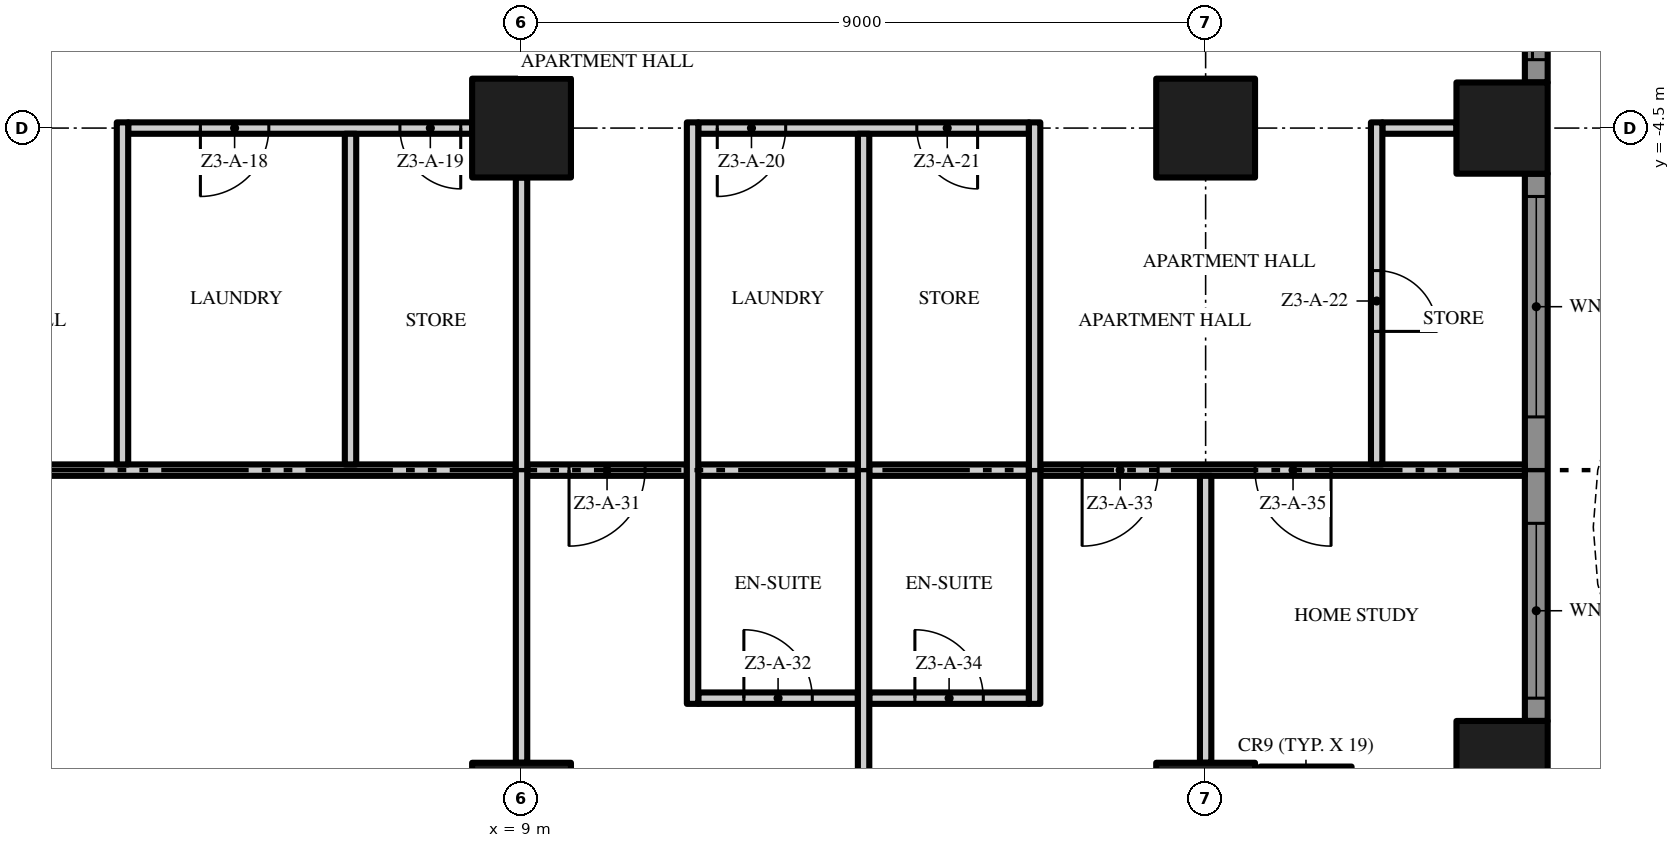
"""IFC4 building model, lengths in metres.
Left out: names, types, materials, properties, quantities, classifications, styles, units other than length and angle.
Written with IfcOpenShell. Run it as: python <this file> out.ifc"""

import sys

from ifc_helpers import new_model, si_unit, direction, frame, frame_2d, origin, origin_2d, place, context, subcontext, project, spatial, polyline, rectangle, outline, extrude, element, fill, save


model = new_model("IFC4")
c1 = context("Model", 3, precision=1e-05, world=origin(), true_north=direction((0.0, 1.0)))
c2 = subcontext(c1, "Body", "Model", "MODEL_VIEW")
j1 = project(units=[si_unit("LENGTHUNIT", "METRE"), si_unit("PLANEANGLEUNIT", "RADIAN")], contexts=[c1])
p1 = place(None, origin())
s1 = spatial("IfcSite", under=j1, at=p1, CompositionType="ELEMENT")
p2 = place(p1, origin())
s2 = spatial("IfcBuilding", under=s1, at=p2, CompositionType="ELEMENT")
p3 = place(p2, frame((0.0, 0.0, 128.8)))
s3 = spatial("IfcBuildingStorey", under=s2, at=p3, CompositionType="ELEMENT", Elevation=128.8)
for number, where, z_axis, x_axis in (
    (1, (18.0, -13.5, 0.0), (0.0, 0.0, 1.0), (1.0, 0.0, 0.0)),
    (2, (18.0, -4.5, 0.0), (0.0, 0.0, 1.0), (1.0, 0.0, 0.0)),
):
    element("IfcColumn", number, at=place(p3, frame(where, z_axis=z_axis, x_axis=x_axis)), inside=s3, PredefinedType="COLUMN", context=c2, shape_type="SweptSolid", body=[
        extrude(rectangle(XDim=1.3, YDim=1.3, at=origin_2d()), origin(), (0.0, 0.0, 1.0), 3.5),
    ])
for number, where, z_axis, x_axis in (
    (3, (21.9, -12.9, 0.0), (0.0, 0.0, 1.0), (1.0, 0.0, 0.0)),
    (4, (19.32, -13.5, 0.0), (0.0, 0.0, 1.0), (1.0, 0.0, 0.0)),
    (5, (21.9, -4.5, 0.0), (0.0, 0.0, 1.0), (1.0, 0.0, 0.0)),
):
    element("IfcColumn", number, at=place(p3, frame(where, z_axis=z_axis, x_axis=x_axis)), inside=s3, PredefinedType="COLUMN", context=c2, shape_type="SweptSolid", body=[
        extrude(rectangle(XDim=1.2, YDim=1.2, at=origin_2d()), origin(), (0.0, 0.0, 1.0), 3.5),
    ])
for number, where, z_axis, x_axis in (
    (6, (9.0, -13.5, 0.0), (0.0, 0.0, 1.0), (1.0, 0.0, 0.0)),
    (7, (9.0, -4.5, 0.0), (0.0, 0.0, 1.0), (1.0, 0.0, 0.0)),
):
    element("IfcColumn", number, at=place(p3, frame(where, z_axis=z_axis, x_axis=x_axis)), inside=s3, PredefinedType="COLUMN", context=c2, shape_type="SweptSolid", body=[
        extrude(rectangle(XDim=1.3, YDim=1.3, at=origin_2d()), origin(), (0.0, 0.0, 1.0), 3.5),
    ])
p4 = place(p3, frame((22.35, -5.1, 0.0), z_axis=(0.0, 0.0, 1.0), x_axis=(0.0, -1.0, 0.0)))
e8 = element("IfcWall", 8, at=p4, inside=s3, PredefinedType="SOLIDWALL", context=c2, shape_type="SweptSolid", body=[
    extrude(rectangle(XDim=7.2, YDim=0.3, at=frame_2d((3.6, 0.0))), origin(), (0.0, 0.0, 1.0), 3.5),
])
p5 = place(p4, frame((4.6, 0.0, 0.45)))
e9 = element("IfcOpeningElement", 9, at=p5, cuts=e8, PredefinedType="OPENING", context=c2, shape_type="SweptSolid", body=[
    extrude(rectangle(XDim=2.3, YDim=2.65, at=frame_2d((1.15, 1.325))), frame((0.0, 0.16, 0.0), z_axis=(0.0, -1.0, 0.0), x_axis=(1.0, 0.0, 0.0)), (0.0, 0.0, 1.0), 0.32),
])
p6 = place(p4, frame((0.3, 0.0, 0.45)))
e10 = element("IfcOpeningElement", 10, at=p6, cuts=e8, PredefinedType="OPENING", context=c2, shape_type="SweptSolid", body=[
    extrude(rectangle(XDim=2.9, YDim=2.65, at=frame_2d((1.45, 1.325))), frame((0.0, 0.16, 0.0), z_axis=(0.0, -1.0, 0.0), x_axis=(1.0, 0.0, 0.0)), (0.0, 0.0, 1.0), 0.32),
])
p7 = place(p3, frame((22.35, 3.9, 0.0), z_axis=(0.0, 0.0, 1.0), x_axis=(0.0, -1.0, 0.0)))
e11 = element("IfcWall", 11, at=p7, inside=s3, PredefinedType="SOLIDWALL", context=c2, shape_type="SweptSolid", body=[
    extrude(rectangle(XDim=7.8, YDim=0.3, at=frame_2d((3.9, 0.0))), origin(), (0.0, 0.0, 1.0), 3.5),
])
p8 = place(p7, frame((4.6, 0.0, 0.0)))
e12 = element("IfcOpeningElement", 12, at=p8, cuts=e11, PredefinedType="OPENING", context=c2, shape_type="SweptSolid", body=[
    extrude(rectangle(XDim=2.9, YDim=2.4, at=frame_2d((1.45, 1.2))), frame((0.0, 0.16, 0.0), z_axis=(0.0, -1.0, 0.0), x_axis=(1.0, 0.0, 0.0)), (0.0, 0.0, 1.0), 0.32),
])
p9 = place(p7, frame((0.3, 0.0, 0.45)))
e13 = element("IfcOpeningElement", 13, at=p9, cuts=e11, PredefinedType="OPENING", context=c2, shape_type="SweptSolid", body=[
    extrude(rectangle(XDim=2.9, YDim=2.65, at=frame_2d((1.45, 1.325))), frame((0.0, 0.16, 0.0), z_axis=(0.0, -1.0, 0.0), x_axis=(1.0, 0.0, 0.0)), (0.0, 0.0, 1.0), 0.32),
])
p10 = place(p3, origin())
e14 = element("IfcWall", 14, at=p10, inside=s3, PredefinedType="USERDEFINED", context=c2, shape_type="SweptSolid", body=[
    extrude(outline(polyline([(24.3, -13.5), (23.595, -12.0), (23.159, -10.5), (23.1, -9.75), (23.159, -9.0), (23.595, -7.5), (24.3, -6.0), (25.005, -4.5), (25.441, -3.0), (25.5, -2.25), (25.441, -1.5), (25.005, 0.0), (24.3, 1.5), (23.595, 3.0), (23.159, 4.5), (23.1, 5.25), (23.159, 6.0), (23.595, 7.5), (24.3, 9.0), (25.005, 10.5), (25.441, 12.0), (25.5, 12.75), (25.441, 13.5), (25.005, 15.0), (24.3, 16.5), (23.595, 18.0), (23.368, 17.894), (24.074, 16.394), (24.771, 14.911), (25.194, 13.455), (25.249, 12.75), (25.194, 12.045), (24.771, 10.589), (24.074, 9.106), (23.36, 7.589), (22.911, 6.045), (22.849, 5.25), (22.911, 4.455), (23.36, 2.911), (24.074, 1.394), (24.771, -0.089), (25.194, -1.545), (25.249, -2.25), (25.194, -2.955), (24.771, -4.411), (24.074, -5.894), (23.36, -7.411), (22.911, -8.955), (22.849, -9.75), (22.911, -10.545), (23.36, -12.089), (24.074, -13.606), (24.3, -13.5)])), origin(), (0.0, 0.0, 1.0), 0.9),
])
p11 = place(p3, frame((11.325, -12.0, 0.0), z_axis=(0.0, 0.0, 1.0), x_axis=(1.0, 0.0, 0.0)))
e15 = element("IfcWall", 15, at=p11, inside=s3, PredefinedType="PARTITIONING", context=c2, shape_type="SweptSolid", body=[
    extrude(rectangle(XDim=2.1, YDim=0.15, at=frame_2d((1.05, 0.0))), origin(), (0.0, 0.0, 1.0), 3.5),
])
p12 = place(p11, frame((0.6, 0.0, 0.0)))
e16 = element("IfcOpeningElement", 16, at=p12, cuts=e15, PredefinedType="OPENING", context=c2, shape_type="SweptSolid", body=[
    extrude(rectangle(XDim=0.9, YDim=2.1, at=frame_2d((0.45, 1.05))), frame((0.0, 0.085, 0.0), z_axis=(0.0, -1.0, 0.0), x_axis=(1.0, 0.0, 0.0)), (0.0, 0.0, 1.0), 0.17),
])
p13 = place(p3, frame((13.575, -12.0, 0.0), z_axis=(0.0, 0.0, 1.0), x_axis=(1.0, 0.0, 0.0)))
e17 = element("IfcWall", 17, at=p13, inside=s3, PredefinedType="PARTITIONING", context=c2, shape_type="SweptSolid", body=[
    extrude(rectangle(XDim=2.1, YDim=0.15, at=frame_2d((1.05, 0.0))), origin(), (0.0, 0.0, 1.0), 3.5),
])
p14 = place(p13, frame((0.6, 0.0, 0.0)))
e18 = element("IfcOpeningElement", 18, at=p14, cuts=e17, PredefinedType="OPENING", context=c2, shape_type="SweptSolid", body=[
    extrude(rectangle(XDim=0.9, YDim=2.1, at=frame_2d((0.45, 1.05))), frame((0.0, 0.085, 0.0), z_axis=(0.0, -1.0, 0.0), x_axis=(1.0, 0.0, 0.0)), (0.0, 0.0, 1.0), 0.17),
])
p15 = place(p3, frame((8.925, -9.0, 0.0), z_axis=(0.0, 0.0, 1.0), x_axis=(-1.0, 0.0, 0.0)))
e19 = element("IfcWall", 19, at=p15, inside=s3, PredefinedType="PARTITIONING", context=c2, shape_type="SweptSolid", body=[
    extrude(rectangle(XDim=8.85, YDim=0.15, at=frame_2d((4.425, 0.0))), origin(), (0.0, 0.0, 1.0), 3.5),
])
p16 = place(p15, frame((6.3, 0.0, 0.0)))
e20 = element("IfcOpeningElement", 20, at=p16, cuts=e19, PredefinedType="OPENING", context=c2, shape_type="SweptSolid", body=[
    extrude(rectangle(XDim=1.5, YDim=2.4, at=frame_2d((0.75, 1.2))), frame((0.0, 0.085, 0.0), z_axis=(0.0, -1.0, 0.0), x_axis=(1.0, 0.0, 0.0)), (0.0, 0.0, 1.0), 0.17),
])
p17 = place(p3, frame((11.175, -9.0, 0.0), z_axis=(0.0, 0.0, 1.0), x_axis=(-1.0, 0.0, 0.0)))
e21 = element("IfcWall", 21, at=p17, inside=s3, PredefinedType="PARTITIONING", context=c2, shape_type="SweptSolid", body=[
    extrude(rectangle(XDim=2.1, YDim=0.15, at=frame_2d((1.05, 0.0))), origin(), (0.0, 0.0, 1.0), 3.5),
])
p18 = place(p17, frame((0.55, 0.0, 0.0)))
e22 = element("IfcOpeningElement", 22, at=p18, cuts=e21, PredefinedType="OPENING", context=c2, shape_type="SweptSolid", body=[
    extrude(rectangle(XDim=1.0, YDim=2.4, at=frame_2d((0.5, 1.2))), frame((0.0, 0.085, 0.0), z_axis=(0.0, -1.0, 0.0), x_axis=(1.0, 0.0, 0.0)), (0.0, 0.0, 1.0), 0.17),
])
for number, where, z_axis, x_axis in (
    (23, (11.325, -9.0, 0.0), (0.0, 0.0, 1.0), (1.0, 0.0, 0.0)),
    (24, (13.575, -9.0, 0.0), (0.0, 0.0, 1.0), (1.0, 0.0, 0.0)),
):
    element("IfcWall", number, at=place(p3, frame(where, z_axis=z_axis, x_axis=x_axis)), inside=s3, PredefinedType="PARTITIONING", context=c2, shape_type="SweptSolid", body=[
        extrude(rectangle(XDim=2.1, YDim=0.15, at=frame_2d((1.05, 0.0))), origin(), (0.0, 0.0, 1.0), 3.5),
    ])
p19 = place(p3, frame((22.2, -9.0, 0.0), z_axis=(0.0, 0.0, 1.0), x_axis=(-1.0, 0.0, 0.0)))
e25 = element("IfcWall", 25, at=p19, inside=s3, PredefinedType="PARTITIONING", context=c2, shape_type="SweptSolid", body=[
    extrude(rectangle(XDim=6.375, YDim=0.15, at=frame_2d((3.188, 0.0))), origin(), (0.0, 0.0, 1.0), 3.5),
])
p20 = place(p19, frame((4.825, 0.0, 0.0)))
e26 = element("IfcOpeningElement", 26, at=p20, cuts=e25, PredefinedType="OPENING", context=c2, shape_type="SweptSolid", body=[
    extrude(rectangle(XDim=1.0, YDim=2.4, at=frame_2d((0.5, 1.2))), frame((0.0, 0.085, 0.0), z_axis=(0.0, -1.0, 0.0), x_axis=(1.0, 0.0, 0.0)), (0.0, 0.0, 1.0), 0.17),
])
p21 = place(p19, frame((2.55, 0.0, 0.0)))
e27 = element("IfcOpeningElement", 27, at=p21, cuts=e25, PredefinedType="OPENING", context=c2, shape_type="SweptSolid", body=[
    extrude(rectangle(XDim=1.0, YDim=2.4, at=frame_2d((0.5, 1.2))), frame((0.0, 0.085, 0.0), z_axis=(0.0, -1.0, 0.0), x_axis=(1.0, 0.0, 0.0)), (0.0, 0.0, 1.0), 0.17),
])
p22 = place(p3, frame((8.35, -4.5, 0.0), z_axis=(0.0, 0.0, 1.0), x_axis=(-1.0, 0.0, 0.0)))
e28 = element("IfcWall", 28, at=p22, inside=s3, PredefinedType="PARTITIONING", context=c2, shape_type="SweptSolid", body=[
    extrude(rectangle(XDim=4.525, YDim=0.15, at=frame_2d((2.263, 0.0))), origin(), (0.0, 0.0, 1.0), 3.5),
])
p23 = place(p22, frame((2.675, 0.0, 0.0)))
e29 = element("IfcOpeningElement", 29, at=p23, cuts=e28, PredefinedType="OPENING", context=c2, shape_type="SweptSolid", body=[
    extrude(rectangle(XDim=0.9, YDim=2.1, at=frame_2d((0.45, 1.05))), frame((0.0, 0.085, 0.0), z_axis=(0.0, -1.0, 0.0), x_axis=(1.0, 0.0, 0.0)), (0.0, 0.0, 1.0), 0.17),
])
p24 = place(p22, frame((0.15, 0.0, 0.0)))
e30 = element("IfcOpeningElement", 30, at=p24, cuts=e28, PredefinedType="OPENING", context=c2, shape_type="SweptSolid", body=[
    extrude(rectangle(XDim=0.8, YDim=2.0, at=frame_2d((0.4, 1.0))), frame((0.0, 0.085, 0.0), z_axis=(0.0, -1.0, 0.0), x_axis=(1.0, 0.0, 0.0)), (0.0, 0.0, 1.0), 0.17),
])
p25 = place(p3, frame((15.675, -4.5, 0.0), z_axis=(0.0, 0.0, 1.0), x_axis=(-1.0, 0.0, 0.0)))
e31 = element("IfcWall", 31, at=p25, inside=s3, PredefinedType="PARTITIONING", context=c2, shape_type="SweptSolid", body=[
    extrude(rectangle(XDim=4.35, YDim=0.15, at=frame_2d((2.175, 0.0))), origin(), (0.0, 0.0, 1.0), 3.5),
])
p26 = place(p25, frame((3.2, 0.0, 0.0)))
e32 = element("IfcOpeningElement", 32, at=p26, cuts=e31, PredefinedType="OPENING", context=c2, shape_type="SweptSolid", body=[
    extrude(rectangle(XDim=0.9, YDim=2.1, at=frame_2d((0.45, 1.05))), frame((0.0, 0.085, 0.0), z_axis=(0.0, -1.0, 0.0), x_axis=(1.0, 0.0, 0.0)), (0.0, 0.0, 1.0), 0.17),
])
p27 = place(p25, frame((0.675, 0.0, 0.0)))
e33 = element("IfcOpeningElement", 33, at=p27, cuts=e31, PredefinedType="OPENING", context=c2, shape_type="SweptSolid", body=[
    extrude(rectangle(XDim=0.8, YDim=2.0, at=frame_2d((0.4, 1.0))), frame((0.0, 0.085, 0.0), z_axis=(0.0, -1.0, 0.0), x_axis=(1.0, 0.0, 0.0)), (0.0, 0.0, 1.0), 0.17),
])
p28 = place(p3, frame((20.325, -4.5, 0.0), z_axis=(0.0, 0.0, 1.0), x_axis=(1.0, 0.0, 0.0)))
e34 = element("IfcWall", 34, at=p28, inside=s3, PredefinedType="PARTITIONING", context=c2, shape_type="SweptSolid", body=[
    extrude(rectangle(XDim=0.975, YDim=0.15, at=frame_2d((0.487, 0.0))), origin(), (0.0, 0.0, 1.0), 3.5),
])
p29 = place(p3, frame((3.75, -8.925, 0.0), z_axis=(0.0, 0.0, 1.0), x_axis=(0.0, 1.0, 0.0)))
e35 = element("IfcWall", 35, at=p29, inside=s3, PredefinedType="PARTITIONING", context=c2, shape_type="SweptSolid", body=[
    extrude(rectangle(XDim=4.5, YDim=0.15, at=frame_2d((2.25, 0.0))), origin(), (0.0, 0.0, 1.0), 3.5),
])
p30 = place(p3, frame((6.75, -8.925, 0.0), z_axis=(0.0, 0.0, 1.0), x_axis=(0.0, 1.0, 0.0)))
e36 = element("IfcWall", 36, at=p30, inside=s3, PredefinedType="PARTITIONING", context=c2, shape_type="SweptSolid", body=[
    extrude(rectangle(XDim=4.35, YDim=0.15, at=frame_2d((2.175, 0.0))), origin(), (0.0, 0.0, 1.0), 3.5),
])
p31 = place(p3, frame((9.0, -12.85, 0.0), z_axis=(0.0, 0.0, 1.0), x_axis=(0.0, 1.0, 0.0)))
e37 = element("IfcWall", 37, at=p31, inside=s3, PredefinedType="PARTITIONING", context=c2, shape_type="SweptSolid", body=[
    extrude(rectangle(XDim=7.7, YDim=0.15, at=frame_2d((3.85, 0.0))), origin(), (0.0, 0.0, 1.0), 3.5),
])
p32 = place(p3, frame((11.25, -12.075, 0.0), z_axis=(0.0, 0.0, 1.0), x_axis=(0.0, 1.0, 0.0)))
e38 = element("IfcWall", 38, at=p32, inside=s3, PredefinedType="PARTITIONING", context=c2, shape_type="SweptSolid", body=[
    extrude(rectangle(XDim=7.65, YDim=0.15, at=frame_2d((3.825, 0.0))), origin(), (0.0, 0.0, 1.0), 3.5),
])
p33 = place(p3, frame((13.5, -17.7, 0.0), z_axis=(0.0, 0.0, 1.0), x_axis=(0.0, 1.0, 0.0)))
e39 = element("IfcWall", 39, at=p33, inside=s3, PredefinedType="PARTITIONING", context=c2, shape_type="SweptSolid", body=[
    extrude(rectangle(XDim=13.125, YDim=0.15, at=frame_2d((6.562, 0.0))), origin(), (0.0, 0.0, 1.0), 3.5),
])
p34 = place(p3, frame((15.75, -12.075, 0.0), z_axis=(0.0, 0.0, 1.0), x_axis=(0.0, 1.0, 0.0)))
e40 = element("IfcWall", 40, at=p34, inside=s3, PredefinedType="PARTITIONING", context=c2, shape_type="SweptSolid", body=[
    extrude(rectangle(XDim=7.65, YDim=0.15, at=frame_2d((3.825, 0.0))), origin(), (0.0, 0.0, 1.0), 3.5),
])
p35 = place(p3, frame((18.0, -12.85, 0.0), z_axis=(0.0, 0.0, 1.0), x_axis=(0.0, 1.0, 0.0)))
e41 = element("IfcWall", 41, at=p35, inside=s3, PredefinedType="PARTITIONING", context=c2, shape_type="SweptSolid", body=[
    extrude(rectangle(XDim=3.775, YDim=0.15, at=frame_2d((1.887, 0.0))), origin(), (0.0, 0.0, 1.0), 3.5),
])
p36 = place(p3, frame((20.25, -4.425, 0.0), z_axis=(0.0, 0.0, 1.0), x_axis=(0.0, -1.0, 0.0)))
e42 = element("IfcWall", 42, at=p36, inside=s3, PredefinedType="PARTITIONING", context=c2, shape_type="SweptSolid", body=[
    extrude(rectangle(XDim=4.5, YDim=0.15, at=frame_2d((2.25, 0.0))), origin(), (0.0, 0.0, 1.0), 3.5),
])
p37 = place(p36, frame((1.95, 0.0, 0.0)))
e43 = element("IfcOpeningElement", 43, at=p37, cuts=e42, PredefinedType="OPENING", context=c2, shape_type="SweptSolid", body=[
    extrude(rectangle(XDim=0.8, YDim=2.0, at=frame_2d((0.4, 1.0))), frame((0.0, 0.085, 0.0), z_axis=(0.0, -1.0, 0.0), x_axis=(1.0, 0.0, 0.0)), (0.0, 0.0, 1.0), 0.17),
])
p38 = place(p5, origin())
e44 = element("IfcWindow", 44, at=p38, inside=s3, PartitioningType="SINGLE_PANEL", PredefinedType="WINDOW", context=c2, shape_type="SweptSolid", body=[
    extrude(rectangle(XDim=2.3, YDim=2.65, at=frame_2d((1.15, 1.325))), frame((0.0, 0.03, 0.0), z_axis=(0.0, -1.0, 0.0), x_axis=(1.0, 0.0, 0.0)), (0.0, 0.0, 1.0), 0.06),
])
fill(e9, e44)
p39 = place(p6, origin())
e45 = element("IfcWindow", 45, at=p39, inside=s3, PartitioningType="SINGLE_PANEL", PredefinedType="WINDOW", context=c2, shape_type="SweptSolid", body=[
    extrude(rectangle(XDim=2.9, YDim=2.65, at=frame_2d((1.45, 1.325))), frame((0.0, 0.03, 0.0), z_axis=(0.0, -1.0, 0.0), x_axis=(1.0, 0.0, 0.0)), (0.0, 0.0, 1.0), 0.06),
])
fill(e10, e45)
p40 = place(p8, origin())
e46 = element("IfcDoor", 46, at=p40, inside=s3, OperationType="SINGLE_SWING_LEFT", PredefinedType="DOOR", context=c2, shape_type="SweptSolid", body=[
    extrude(rectangle(XDim=2.9, YDim=2.4, at=frame_2d((1.45, 1.2))), frame((0.0, 0.025, 0.0), z_axis=(0.0, -1.0, 0.0), x_axis=(1.0, 0.0, 0.0)), (0.0, 0.0, 1.0), 0.05),
])
fill(e12, e46)
p41 = place(p23, origin())
e47 = element("IfcDoor", 47, at=p41, inside=s3, OperationType="SINGLE_SWING_RIGHT", PredefinedType="DOOR", context=c2, shape_type="SweptSolid", body=[
    extrude(rectangle(XDim=0.9, YDim=2.1, at=frame_2d((0.45, 1.05))), frame((0.0, 0.025, 0.0), z_axis=(0.0, -1.0, 0.0), x_axis=(1.0, 0.0, 0.0)), (0.0, 0.0, 1.0), 0.05),
])
fill(e29, e47)
p42 = place(p24, origin())
e48 = element("IfcDoor", 48, at=p42, inside=s3, OperationType="SINGLE_SWING_LEFT", PredefinedType="DOOR", context=c2, shape_type="SweptSolid", body=[
    extrude(rectangle(XDim=0.8, YDim=2.0, at=frame_2d((0.4, 1.0))), frame((0.0, 0.025, 0.0), z_axis=(0.0, -1.0, 0.0), x_axis=(1.0, 0.0, 0.0)), (0.0, 0.0, 1.0), 0.05),
])
fill(e30, e48)
p43 = place(p26, origin())
e49 = element("IfcDoor", 49, at=p43, inside=s3, OperationType="SINGLE_SWING_RIGHT", PredefinedType="DOOR", context=c2, shape_type="SweptSolid", body=[
    extrude(rectangle(XDim=0.9, YDim=2.1, at=frame_2d((0.45, 1.05))), frame((0.0, 0.025, 0.0), z_axis=(0.0, -1.0, 0.0), x_axis=(1.0, 0.0, 0.0)), (0.0, 0.0, 1.0), 0.05),
])
fill(e32, e49)
p44 = place(p27, origin())
e50 = element("IfcDoor", 50, at=p44, inside=s3, OperationType="SINGLE_SWING_LEFT", PredefinedType="DOOR", context=c2, shape_type="SweptSolid", body=[
    extrude(rectangle(XDim=0.8, YDim=2.0, at=frame_2d((0.4, 1.0))), frame((0.0, 0.025, 0.0), z_axis=(0.0, -1.0, 0.0), x_axis=(1.0, 0.0, 0.0)), (0.0, 0.0, 1.0), 0.05),
])
fill(e33, e50)
p45 = place(p37, origin())
e51 = element("IfcDoor", 51, at=p45, inside=s3, OperationType="SINGLE_SWING_RIGHT", PredefinedType="DOOR", context=c2, shape_type="SweptSolid", body=[
    extrude(rectangle(XDim=0.8, YDim=2.0, at=frame_2d((0.4, 1.0))), frame((0.0, 0.025, 0.0), z_axis=(0.0, -1.0, 0.0), x_axis=(1.0, 0.0, 0.0)), (0.0, 0.0, 1.0), 0.05),
])
fill(e43, e51)
p46 = place(p18, origin())
e52 = element("IfcDoor", 52, at=p46, inside=s3, OperationType="SINGLE_SWING_RIGHT", PredefinedType="DOOR", context=c2, shape_type="SweptSolid", body=[
    extrude(rectangle(XDim=1.0, YDim=2.4, at=frame_2d((0.5, 1.2))), frame((0.0, 0.025, 0.0), z_axis=(0.0, -1.0, 0.0), x_axis=(1.0, 0.0, 0.0)), (0.0, 0.0, 1.0), 0.05),
])
fill(e22, e52)
p47 = place(p12, origin())
e53 = element("IfcDoor", 53, at=p47, inside=s3, OperationType="SINGLE_SWING_LEFT", PredefinedType="DOOR", context=c2, shape_type="SweptSolid", body=[
    extrude(rectangle(XDim=0.9, YDim=2.1, at=frame_2d((0.45, 1.05))), frame((0.0, 0.025, 0.0), z_axis=(0.0, -1.0, 0.0), x_axis=(1.0, 0.0, 0.0)), (0.0, 0.0, 1.0), 0.05),
])
fill(e16, e53)
p48 = place(p20, origin())
e54 = element("IfcDoor", 54, at=p48, inside=s3, OperationType="SINGLE_SWING_RIGHT", PredefinedType="DOOR", context=c2, shape_type="SweptSolid", body=[
    extrude(rectangle(XDim=1.0, YDim=2.4, at=frame_2d((0.5, 1.2))), frame((0.0, 0.025, 0.0), z_axis=(0.0, -1.0, 0.0), x_axis=(1.0, 0.0, 0.0)), (0.0, 0.0, 1.0), 0.05),
])
fill(e26, e54)
p49 = place(p14, origin())
e55 = element("IfcDoor", 55, at=p49, inside=s3, OperationType="SINGLE_SWING_LEFT", PredefinedType="DOOR", context=c2, shape_type="SweptSolid", body=[
    extrude(rectangle(XDim=0.9, YDim=2.1, at=frame_2d((0.45, 1.05))), frame((0.0, 0.025, 0.0), z_axis=(0.0, -1.0, 0.0), x_axis=(1.0, 0.0, 0.0)), (0.0, 0.0, 1.0), 0.05),
])
fill(e18, e55)
p50 = place(p21, origin())
e56 = element("IfcDoor", 56, at=p50, inside=s3, OperationType="SINGLE_SWING_LEFT", PredefinedType="DOOR", context=c2, shape_type="SweptSolid", body=[
    extrude(rectangle(XDim=1.0, YDim=2.4, at=frame_2d((0.5, 1.2))), frame((0.0, 0.025, 0.0), z_axis=(0.0, -1.0, 0.0), x_axis=(1.0, 0.0, 0.0)), (0.0, 0.0, 1.0), 0.05),
])
fill(e27, e56)
save(model, sys.argv[1])
